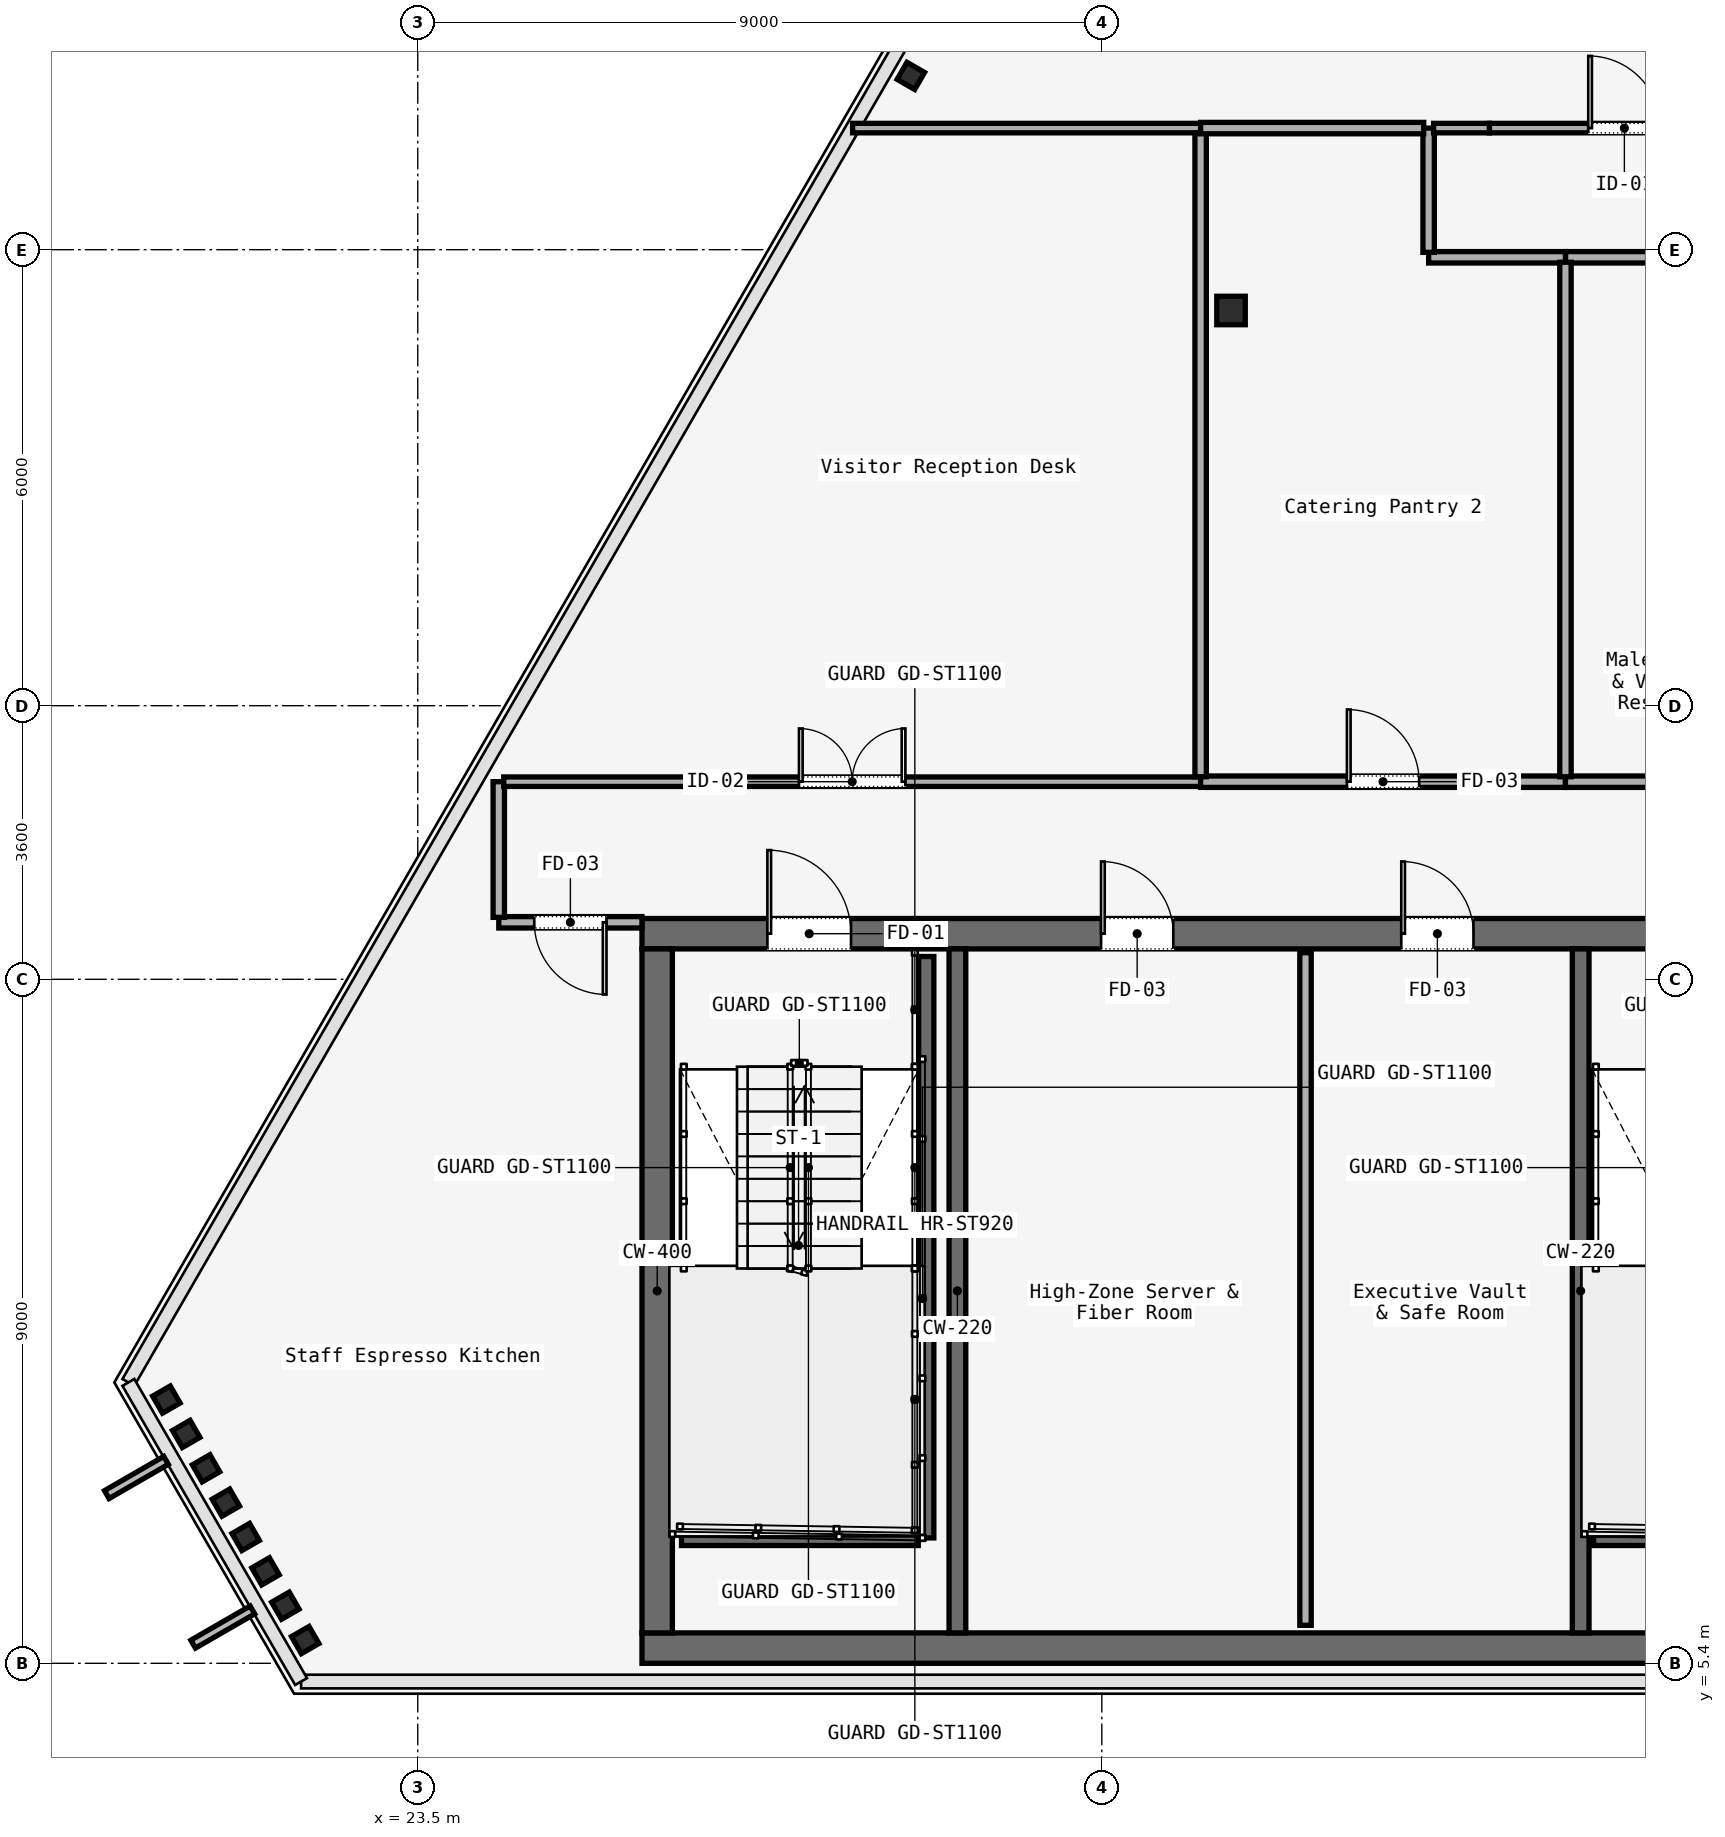
"""IFC4 building model, lengths in metres.
Left out: names, types, materials, properties, quantities, classifications, styles, units other than length and angle.
Written with IfcOpenShell. Run it as: python <this file> out.ifc"""

import sys

from ifc_helpers import new_model, si_unit, direction, frame, frame_2d, origin, origin_2d, place, context, subcontext, project, spatial, rectangle, i_section, extrude, element, fill, save


model = new_model("IFC4")
c1 = context("Model", 3, precision=1e-05, world=origin(), true_north=direction((0.0, 1.0)))
c2 = subcontext(c1, "Body", "Model", "MODEL_VIEW")
j1 = project(units=[si_unit("LENGTHUNIT", "METRE"), si_unit("PLANEANGLEUNIT", "RADIAN")], contexts=[c1])
p1 = place(None, origin())
s1 = spatial("IfcSite", under=j1, at=p1, CompositionType="ELEMENT")
p2 = place(p1, origin())
s2 = spatial("IfcBuilding", under=s1, at=p2, CompositionType="ELEMENT")
p3 = place(p2, frame((0.0, 0.0, 287.1)))
s3 = spatial("IfcBuildingStorey", under=s2, at=p3, CompositionType="ELEMENT", Elevation=287.1)
p4 = place(p3, frame((26.45, 15.0, 0.0), z_axis=(0.0, 0.0, 1.0), x_axis=(1.0, 0.0, 0.0)))
e1 = element("IfcWall", 1, at=p4, inside=s3, PredefinedType="SOLIDWALL", context=c2, shape_type="SweptSolid", body=[
    extrude(rectangle(XDim=31.1, YDim=0.4, at=frame_2d((15.55, 0.0))), origin(), (0.0, 0.0, 1.0), 3.58),
])
p5 = place(p4, frame((1.65, 0.0, 0.0)))
e2 = element("IfcOpeningElement", 2, at=p5, cuts=e1, PredefinedType="OPENING", context=c2, shape_type="SweptSolid", body=[
    extrude(rectangle(XDim=1.1, YDim=2.2, at=frame_2d((0.55, 1.1))), frame((0.0, 0.2, 0.0), z_axis=(0.0, -1.0, 0.0), x_axis=(1.0, 0.0, 0.0)), (0.0, 0.0, 1.0), 0.4),
])
p6 = place(p4, frame((13.65, 0.0, 0.0)))
e3 = element("IfcOpeningElement", 3, at=p6, cuts=e1, PredefinedType="OPENING", context=c2, shape_type="SweptSolid", body=[
    extrude(rectangle(XDim=1.1, YDim=2.2, at=frame_2d((0.55, 1.1))), frame((0.0, 0.2, 0.0), z_axis=(0.0, -1.0, 0.0), x_axis=(1.0, 0.0, 0.0)), (0.0, 0.0, 1.0), 0.4),
])
p7 = place(p4, frame((25.55, 0.0, 0.0)))
e4 = element("IfcOpeningElement", 4, at=p7, cuts=e1, PredefinedType="OPENING", context=c2, shape_type="SweptSolid", body=[
    extrude(rectangle(XDim=1.1, YDim=2.2, at=frame_2d((0.55, 1.1))), frame((0.0, 0.2, 0.0), z_axis=(0.0, -1.0, 0.0), x_axis=(1.0, 0.0, 0.0)), (0.0, 0.0, 1.0), 0.4),
])
p8 = place(p4, frame((19.35, 0.0, 0.0)))
e5 = element("IfcOpeningElement", 5, at=p8, cuts=e1, PredefinedType="OPENING", context=c2, shape_type="SweptSolid", body=[
    extrude(rectangle(XDim=1.1, YDim=2.2, at=frame_2d((0.55, 1.1))), frame((0.0, 0.2, 0.0), z_axis=(0.0, -1.0, 0.0), x_axis=(1.0, 0.0, 0.0)), (0.0, 0.0, 1.0), 0.4),
])
p9 = place(p4, frame((21.4, 0.0, 0.0)))
e6 = element("IfcOpeningElement", 6, at=p9, cuts=e1, PredefinedType="OPENING", context=c2, shape_type="SweptSolid", body=[
    extrude(rectangle(XDim=0.9, YDim=2.1, at=frame_2d((0.45, 1.05))), frame((0.0, 0.2, 0.0), z_axis=(0.0, -1.0, 0.0), x_axis=(1.0, 0.0, 0.0)), (0.0, 0.0, 1.0), 0.4),
])
p10 = place(p4, frame((6.04, 0.0, 0.0)))
e7 = element("IfcOpeningElement", 7, at=p10, cuts=e1, PredefinedType="OPENING", context=c2, shape_type="SweptSolid", body=[
    extrude(rectangle(XDim=0.95, YDim=2.2, at=frame_2d((0.475, 1.1))), frame((0.0, 0.2, 0.0), z_axis=(0.0, -1.0, 0.0), x_axis=(1.0, 0.0, 0.0)), (0.0, 0.0, 1.0), 0.4),
])
p11 = place(p4, frame((9.99, 0.0, 0.0)))
e8 = element("IfcOpeningElement", 8, at=p11, cuts=e1, PredefinedType="OPENING", context=c2, shape_type="SweptSolid", body=[
    extrude(rectangle(XDim=0.95, YDim=2.2, at=frame_2d((0.475, 1.1))), frame((0.0, 0.2, 0.0), z_axis=(0.0, -1.0, 0.0), x_axis=(1.0, 0.0, 0.0)), (0.0, 0.0, 1.0), 0.4),
])
p12 = place(p4, frame((23.35, 0.0, 0.0)))
e9 = element("IfcOpeningElement", 9, at=p12, cuts=e1, PredefinedType="OPENING", context=c2, shape_type="SweptSolid", body=[
    extrude(rectangle(XDim=1.3, YDim=2.3, at=frame_2d((0.65, 1.15))), frame((0.0, 0.2, 0.0), z_axis=(0.0, -1.0, 0.0), x_axis=(1.0, 0.0, 0.0)), (0.0, 0.0, 1.0), 0.4),
])
p13 = place(p3, frame((26.45, 5.6, 0.0), z_axis=(0.0, 0.0, 1.0), x_axis=(1.0, 0.0, 0.0)))
e10 = element("IfcWall", 10, at=p13, inside=s3, PredefinedType="SOLIDWALL", context=c2, shape_type="SweptSolid", body=[
    extrude(rectangle(XDim=31.1, YDim=0.4, at=frame_2d((15.55, 0.0))), origin(), (0.0, 0.0, 1.0), 3.58),
])
p14 = place(p3, frame((26.65, 5.8, 0.0), z_axis=(0.0, 0.0, 1.0), x_axis=(0.0, 1.0, 0.0)))
e11 = element("IfcWall", 11, at=p14, inside=s3, PredefinedType="SOLIDWALL", context=c2, shape_type="SweptSolid", body=[
    extrude(rectangle(XDim=9.0, YDim=0.4, at=frame_2d((4.5, 0.0))), origin(), (0.0, 0.0, 1.0), 3.58),
])
for number, where, z_axis, x_axis in (
    (12, (30.6, 5.8, 0.0), (0.0, 0.0, 1.0), (0.0, 1.0, 0.0)),
    (13, (38.8, 5.8, 0.0), (0.0, 0.0, 1.0), (0.0, 1.0, 0.0)),
):
    element("IfcWall", number, at=place(p3, frame(where, z_axis=z_axis, x_axis=x_axis)), inside=s3, PredefinedType="SOLIDWALL", context=c2, shape_type="SweptSolid", body=[
        extrude(rectangle(XDim=9.0, YDim=0.22, at=frame_2d((4.5, 0.0))), origin(), (0.0, 0.0, 1.0), 3.58),
    ])
p15 = place(p3, frame((34.2, 23.2, 0.0), z_axis=(0.0, 0.0, 1.0), x_axis=(1.0, 0.0, 0.0)))
e14 = element("IfcColumn", 14, at=p15, inside=s3, PredefinedType="COLUMN", context=c2, shape_type="SweptSolid", body=[
    extrude(i_section(OverallWidth=0.375, OverallDepth=0.375, WebThickness=0.017, FlangeThickness=0.027, FilletRadius=0.015, at=origin_2d()), origin(), (0.0, 0.0, 1.0), 3.58),
])
for number, where, z_axis, x_axis in (
    (15, (29.987, 26.287, 0.0), (0.0, 0.0, 1.0), (0.5, 0.866, 0.0)),
    (16, (20.193, 8.87, 0.0), (0.0, 0.0, 1.0), (-0.5, 0.866, 0.0)),
    (17, (20.454, 8.418, 0.0), (0.0, 0.0, 1.0), (-0.5, 0.866, 0.0)),
    (18, (20.714, 7.966, 0.0), (0.0, 0.0, 1.0), (-0.5, 0.866, 0.0)),
    (19, (20.975, 7.514, 0.0), (0.0, 0.0, 1.0), (-0.5, 0.866, 0.0)),
    (20, (21.236, 7.062, 0.0), (0.0, 0.0, 1.0), (-0.5, 0.866, 0.0)),
    (21, (21.497, 6.61, 0.0), (0.0, 0.0, 1.0), (-0.5, 0.866, 0.0)),
    (22, (21.758, 6.158, 0.0), (0.0, 0.0, 1.0), (-0.5, 0.866, 0.0)),
    (23, (22.019, 5.706, 0.0), (0.0, 0.0, 1.0), (-0.5, 0.866, 0.0)),
):
    element("IfcColumn", number, at=place(p3, frame(where, z_axis=z_axis, x_axis=x_axis)), inside=s3, PredefinedType="COLUMN", context=c2, shape_type="SweptSolid", body=[
        extrude(i_section(OverallWidth=0.259, OverallDepth=0.267, WebThickness=0.013, FlangeThickness=0.021, FilletRadius=0.013, at=origin_2d()), origin(), (0.0, 0.0, 1.0), 3.58),
    ])
p16 = place(p3, frame((30.19, 14.7, 0.0), z_axis=(0.0, 0.0, 1.0), x_axis=(0.0, -1.0, 0.0)))
e24 = element("IfcWall", 24, at=p16, inside=s3, PredefinedType="SOLIDWALL", context=c2, shape_type="SweptSolid", body=[
    extrude(rectangle(XDim=7.65, YDim=0.2, at=frame_2d((3.825, 0.0))), origin(), (0.0, 0.0, 1.0), 3.8),
])
for number, where, z_axis, x_axis in (
    (25, (26.97, 7.05, 0.0), (0.0, 0.0, 1.0), (1.0, 0.0, 0.0)),
    (26, (38.97, 7.05, 0.0), (0.0, 0.0, 1.0), (1.0, 0.0, 0.0)),
):
    element("IfcWall", number, at=place(p3, frame(where, z_axis=z_axis, x_axis=x_axis)), inside=s3, PredefinedType="SOLIDWALL", context=c2, shape_type="SweptSolid", body=[
        extrude(rectangle(XDim=3.115, YDim=0.2, at=frame_2d((1.558, 0.0))), origin(), (0.0, 0.0, 1.0), 3.8),
    ])
p17 = place(p3, frame((35.18, 5.9, 0.0), z_axis=(0.0, 0.0, 1.0), x_axis=(0.0, 1.0, 0.0)))
e27 = element("IfcWall", 27, at=p17, inside=s3, PredefinedType="PARTITIONING", context=c2, shape_type="SweptSolid", body=[
    extrude(rectangle(XDim=8.85, YDim=0.15, at=frame_2d((4.425, 0.0))), origin(), (0.0, 0.0, 1.0), 3.01),
])
p18 = place(p3, frame((26.45, 15.15, 0.0), z_axis=(0.0, 0.0, 1.0), x_axis=(-1.0, 0.0, 0.0)))
e28 = element("IfcWall", 28, at=p18, inside=s3, PredefinedType="PARTITIONING", context=c2, shape_type="SweptSolid", body=[
    extrude(rectangle(XDim=1.884, YDim=0.15, at=frame_2d((0.942, 0.0))), origin(), (0.0, 0.0, 1.0), 3.01),
])
p19 = place(p18, frame((0.467, 0.0, 0.0)))
e29 = element("IfcOpeningElement", 29, at=p19, cuts=e28, PredefinedType="OPENING", context=c2, shape_type="SweptSolid", body=[
    extrude(rectangle(XDim=0.95, YDim=2.2, at=frame_2d((0.475, 1.1))), frame((0.0, 0.075, 0.0), z_axis=(0.0, -1.0, 0.0), x_axis=(1.0, 0.0, 0.0)), (0.0, 0.0, 1.0), 0.15),
])
p20 = place(p3, frame((24.566, 15.215, 0.0), z_axis=(0.0, 0.0, 1.0), x_axis=(0.0, 1.0, 0.0)))
e30 = element("IfcWall", 30, at=p20, inside=s3, PredefinedType="PARTITIONING", context=c2, shape_type="SweptSolid", body=[
    extrude(rectangle(XDim=1.785, YDim=0.15, at=frame_2d((0.893, 0.0))), origin(), (0.0, 0.0, 1.0), 3.01),
])
p21 = place(p3, frame((24.631, 17.0, 0.0), z_axis=(0.0, 0.0, 1.0), x_axis=(1.0, 0.0, 0.0)))
e31 = element("IfcWall", 31, at=p21, inside=s3, PredefinedType="PARTITIONING", context=c2, shape_type="SweptSolid", body=[
    extrude(rectangle(XDim=9.169, YDim=0.125, at=frame_2d((4.584, 0.0))), origin(), (0.0, 0.0, 1.0), 3.01),
])
p22 = place(p21, frame((3.885, 0.0, 0.0)))
e32 = element("IfcOpeningElement", 32, at=p22, cuts=e31, PredefinedType="OPENING", context=c2, shape_type="SweptSolid", body=[
    extrude(rectangle(XDim=1.4, YDim=2.2, at=frame_2d((0.7, 1.1))), frame((0.0, 0.062, 0.0), z_axis=(0.0, -1.0, 0.0), x_axis=(1.0, 0.0, 0.0)), (0.0, 0.0, 1.0), 0.125),
])
p23 = place(p3, frame((33.8, 17.0, 0.0), z_axis=(0.0, 0.0, 1.0), x_axis=(1.0, 0.0, 0.0)))
e33 = element("IfcWall", 33, at=p23, inside=s3, PredefinedType="PARTITIONING", context=c2, shape_type="SweptSolid", body=[
    extrude(rectangle(XDim=4.8, YDim=0.15, at=frame_2d((2.4, 0.0))), origin(), (0.0, 0.0, 1.0), 3.01),
])
p24 = place(p23, frame((1.925, 0.0, 0.0)))
e34 = element("IfcOpeningElement", 34, at=p24, cuts=e33, PredefinedType="OPENING", context=c2, shape_type="SweptSolid", body=[
    extrude(rectangle(XDim=0.95, YDim=2.2, at=frame_2d((0.475, 1.1))), frame((0.0, 0.075, 0.0), z_axis=(0.0, -1.0, 0.0), x_axis=(1.0, 0.0, 0.0)), (0.0, 0.0, 1.0), 0.15),
])
p25 = place(p3, frame((38.6, 17.0, 0.0), z_axis=(0.0, 0.0, 1.0), x_axis=(1.0, 0.0, 0.0)))
e35 = element("IfcWall", 35, at=p25, inside=s3, PredefinedType="PARTITIONING", context=c2, shape_type="SweptSolid", body=[
    extrude(rectangle(XDim=2.55, YDim=0.15, at=frame_2d((1.275, 0.0))), origin(), (0.0, 0.0, 1.0), 3.01),
])
p26 = place(p3, frame((41.085, 23.9, 0.0), z_axis=(0.0, 0.0, 1.0), x_axis=(-1.0, 0.0, 0.0)))
e36 = element("IfcWall", 36, at=p26, inside=s3, PredefinedType="PARTITIONING", context=c2, shape_type="SweptSolid", body=[
    extrude(rectangle(XDim=2.485, YDim=0.15, at=frame_2d((1.242, 0.0))), origin(), (0.0, 0.0, 1.0), 3.01),
])
p27 = place(p3, frame((38.6, 23.9, 0.0), z_axis=(0.0, 0.0, 1.0), x_axis=(-1.0, 0.0, 0.0)))
e37 = element("IfcWall", 37, at=p27, inside=s3, PredefinedType="PARTITIONING", context=c2, shape_type="SweptSolid", body=[
    extrude(rectangle(XDim=1.8, YDim=0.15, at=frame_2d((0.9, 0.0))), origin(), (0.0, 0.0, 1.0), 3.01),
])
p28 = place(p3, frame((36.8, 23.965, 0.0), z_axis=(0.0, 0.0, 1.0), x_axis=(0.0, 1.0, 0.0)))
e38 = element("IfcWall", 38, at=p28, inside=s3, PredefinedType="PARTITIONING", context=c2, shape_type="SweptSolid", body=[
    extrude(rectangle(XDim=1.635, YDim=0.15, at=frame_2d((0.817, 0.0))), origin(), (0.0, 0.0, 1.0), 3.01),
])
p29 = place(p3, frame((36.865, 25.6, 0.0), z_axis=(0.0, 0.0, 1.0), x_axis=(1.0, 0.0, 0.0)))
e39 = element("IfcWall", 39, at=p29, inside=s3, PredefinedType="PARTITIONING", context=c2, shape_type="SweptSolid", body=[
    extrude(rectangle(XDim=0.735, YDim=0.125, at=frame_2d((0.368, 0.0))), origin(), (0.0, 0.0, 1.0), 3.01),
])
p30 = place(p3, frame((37.6, 25.6, 0.0), z_axis=(0.0, 0.0, 1.0), x_axis=(1.0, 0.0, 0.0)))
e40 = element("IfcWall", 40, at=p30, inside=s3, PredefinedType="PARTITIONING", context=c2, shape_type="SweptSolid", body=[
    extrude(rectangle(XDim=3.55, YDim=0.125, at=frame_2d((1.775, 0.0))), origin(), (0.0, 0.0, 1.0), 3.01),
])
p31 = place(p30, frame((1.3, 0.0, 0.0)))
e41 = element("IfcOpeningElement", 41, at=p31, cuts=e40, PredefinedType="OPENING", context=c2, shape_type="SweptSolid", body=[
    extrude(rectangle(XDim=0.95, YDim=2.2, at=frame_2d((0.475, 1.1))), frame((0.0, 0.062, 0.0), z_axis=(0.0, -1.0, 0.0), x_axis=(1.0, 0.0, 0.0)), (0.0, 0.0, 1.0), 0.125),
])
p32 = place(p3, frame((38.6, 17.065, 0.0), z_axis=(0.0, 0.0, 1.0), x_axis=(0.0, 1.0, 0.0)))
e42 = element("IfcWall", 42, at=p32, inside=s3, PredefinedType="PARTITIONING", context=c2, shape_type="SweptSolid", body=[
    extrude(rectangle(XDim=6.77, YDim=0.15, at=frame_2d((3.385, 0.0))), origin(), (0.0, 0.0, 1.0), 3.01),
])
p33 = place(p3, frame((29.221, 25.6, 0.0), z_axis=(0.0, 0.0, 1.0), x_axis=(1.0, 0.0, 0.0)))
e43 = element("IfcWall", 43, at=p33, inside=s3, PredefinedType="PARTITIONING", context=c2, shape_type="SweptSolid", body=[
    extrude(rectangle(XDim=4.579, YDim=0.125, at=frame_2d((2.29, 0.0))), origin(), (0.0, 0.0, 1.0), 3.01),
])
p34 = place(p3, frame((33.8, 25.535, 0.0), z_axis=(0.0, 0.0, 1.0), x_axis=(0.0, -1.0, 0.0)))
e44 = element("IfcWall", 44, at=p34, inside=s3, PredefinedType="PARTITIONING", context=c2, shape_type="SweptSolid", body=[
    extrude(rectangle(XDim=8.47, YDim=0.15, at=frame_2d((4.235, 0.0))), origin(), (0.0, 0.0, 1.0), 3.01),
])
p35 = place(p3, frame((33.8, 25.6, 0.0), z_axis=(0.0, 0.0, 1.0), x_axis=(1.0, 0.0, 0.0)))
e45 = element("IfcWall", 45, at=p35, inside=s3, PredefinedType="PARTITIONING", context=c2, shape_type="SweptSolid", body=[
    extrude(rectangle(XDim=2.935, YDim=0.15, at=frame_2d((1.468, 0.0))), origin(), (0.0, 0.0, 1.0), 3.01),
])
p36 = place(p5, origin())
e46 = element("IfcDoor", 46, at=p36, inside=s3, OperationType="SINGLE_SWING_LEFT", PredefinedType="DOOR", context=c2, shape_type="SweptSolid", body=[
    extrude(rectangle(XDim=1.1, YDim=2.2, at=frame_2d((0.55, 1.1))), frame((0.0, 0.025, 0.0), z_axis=(0.0, -1.0, 0.0), x_axis=(1.0, 0.0, 0.0)), (0.0, 0.0, 1.0), 0.05),
])
fill(e2, e46)
p37 = place(p10, origin())
e47 = element("IfcDoor", 47, at=p37, inside=s3, OperationType="SINGLE_SWING_LEFT", PredefinedType="DOOR", context=c2, shape_type="SweptSolid", body=[
    extrude(rectangle(XDim=0.95, YDim=2.2, at=frame_2d((0.475, 1.1))), frame((0.0, 0.025, 0.0), z_axis=(0.0, -1.0, 0.0), x_axis=(1.0, 0.0, 0.0)), (0.0, 0.0, 1.0), 0.05),
])
fill(e7, e47)
p38 = place(p11, origin())
e48 = element("IfcDoor", 48, at=p38, inside=s3, OperationType="SINGLE_SWING_RIGHT", PredefinedType="DOOR", context=c2, shape_type="SweptSolid", body=[
    extrude(rectangle(XDim=0.95, YDim=2.2, at=frame_2d((0.475, 1.1))), frame((0.0, 0.025, 0.0), z_axis=(0.0, -1.0, 0.0), x_axis=(1.0, 0.0, 0.0)), (0.0, 0.0, 1.0), 0.05),
])
fill(e8, e48)
p39 = place(p19, origin())
e49 = element("IfcDoor", 49, at=p39, inside=s3, OperationType="SINGLE_SWING_LEFT", PredefinedType="DOOR", context=c2, shape_type="SweptSolid", body=[
    extrude(rectangle(XDim=0.95, YDim=2.2, at=frame_2d((0.475, 1.1))), frame((0.0, 0.025, 0.0), z_axis=(0.0, -1.0, 0.0), x_axis=(1.0, 0.0, 0.0)), (0.0, 0.0, 1.0), 0.05),
])
fill(e29, e49)
p40 = place(p22, origin())
e50 = element("IfcDoor", 50, at=p40, inside=s3, OperationType="SINGLE_SWING_LEFT", PredefinedType="DOOR", context=c2, shape_type="SweptSolid", body=[
    extrude(rectangle(XDim=1.4, YDim=2.2, at=frame_2d((0.7, 1.1))), frame((0.0, 0.025, 0.0), z_axis=(0.0, -1.0, 0.0), x_axis=(1.0, 0.0, 0.0)), (0.0, 0.0, 1.0), 0.05),
])
fill(e32, e50)
p41 = place(p24, origin())
e51 = element("IfcDoor", 51, at=p41, inside=s3, OperationType="SINGLE_SWING_LEFT", PredefinedType="DOOR", context=c2, shape_type="SweptSolid", body=[
    extrude(rectangle(XDim=0.95, YDim=2.2, at=frame_2d((0.475, 1.1))), frame((0.0, 0.025, 0.0), z_axis=(0.0, -1.0, 0.0), x_axis=(1.0, 0.0, 0.0)), (0.0, 0.0, 1.0), 0.05),
])
fill(e34, e51)
p42 = place(p31, origin())
e52 = element("IfcDoor", 52, at=p42, inside=s3, OperationType="SINGLE_SWING_LEFT", PredefinedType="DOOR", context=c2, shape_type="SweptSolid", body=[
    extrude(rectangle(XDim=0.95, YDim=2.2, at=frame_2d((0.475, 1.1))), frame((0.0, 0.025, 0.0), z_axis=(0.0, -1.0, 0.0), x_axis=(1.0, 0.0, 0.0)), (0.0, 0.0, 1.0), 0.05),
])
fill(e41, e52)
save(model, sys.argv[1])
